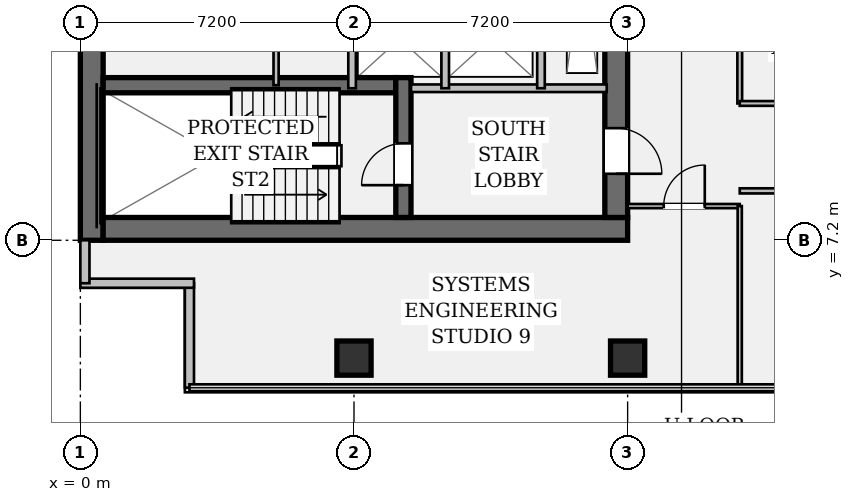
"""IFC4 building model, lengths in metres.
Left out: names, types, materials, properties, quantities, classifications, styles, units other than length and angle.
Written with IfcOpenShell. Run it as: python <this file> out.ifc"""

import sys

from ifc_helpers import new_model, si_unit, direction, frame, frame_2d, origin, origin_2d, place, context, subcontext, project, spatial, rectangle, hollow_rectangle, extrude, element, fill, save


model = new_model("IFC4")
c1 = context("Model", 3, precision=1e-05, world=origin(), true_north=direction((0.0, 1.0)))
c2 = subcontext(c1, "Body", "Model", "MODEL_VIEW")
j1 = project(units=[si_unit("LENGTHUNIT", "METRE"), si_unit("PLANEANGLEUNIT", "RADIAN")], contexts=[c1])
p1 = place(None, origin())
s1 = spatial("IfcSite", under=j1, at=p1, CompositionType="ELEMENT")
p2 = place(p1, origin())
s2 = spatial("IfcBuilding", under=s1, at=p2, CompositionType="ELEMENT")
p3 = place(p2, frame((0.0, 0.0, 117.6)))
s3 = spatial("IfcBuildingStorey", under=s2, at=p3, CompositionType="ELEMENT", Elevation=117.6)
p4 = place(p3, frame((0.3, 7.2, 0.0), z_axis=(0.0, 0.0, 1.0), x_axis=(0.0, 1.0, 0.0)))
e1 = element("IfcWall", 1, at=p4, inside=s3, PredefinedType="SHEAR", context=c2, shape_type="SweptSolid", body=[
    extrude(rectangle(XDim=28.8, YDim=0.6, at=frame_2d((14.4, 0.0))), origin(), (0.0, 0.0, 1.0), 3.58),
])
p5 = place(p3, frame((0.6, 7.5, 0.0), z_axis=(0.0, 0.0, 1.0), x_axis=(1.0, 0.0, 0.0)))
e2 = element("IfcWall", 2, at=p5, inside=s3, PredefinedType="SHEAR", context=c2, shape_type="SweptSolid", body=[
    extrude(rectangle(XDim=13.8, YDim=0.6, at=frame_2d((6.9, 0.0))), origin(), (0.0, 0.0, 1.0), 3.58),
])
p6 = place(p3, frame((14.1, 35.4, 0.0), z_axis=(0.0, 0.0, 1.0), x_axis=(0.0, -1.0, 0.0)))
e3 = element("IfcWall", 3, at=p6, inside=s3, PredefinedType="SHEAR", context=c2, shape_type="SweptSolid", body=[
    extrude(rectangle(XDim=27.6, YDim=0.6, at=frame_2d((13.8, 0.0))), origin(), (0.0, 0.0, 1.0), 3.58),
])
p7 = place(p6, frame((1.3, 0.0, 0.0)))
e4 = element("IfcOpeningElement", 4, at=p7, cuts=e3, PredefinedType="OPENING", context=c2, shape_type="SweptSolid", body=[
    extrude(rectangle(XDim=1.2, YDim=2.15, at=frame_2d((0.6, 1.075))), frame((0.0, 0.312, 0.0), z_axis=(0.0, -1.0, 0.0), x_axis=(1.0, 0.0, 0.0)), (0.0, 0.0, 1.0), 0.624),
])
p8 = place(p6, frame((25.25, 0.0, 0.0)))
e5 = element("IfcOpeningElement", 5, at=p8, cuts=e3, PredefinedType="OPENING", context=c2, shape_type="SweptSolid", body=[
    extrude(rectangle(XDim=1.2, YDim=2.15, at=frame_2d((0.6, 1.075))), frame((0.0, 0.312, 0.0), z_axis=(0.0, -1.0, 0.0), x_axis=(1.0, 0.0, 0.0)), (0.0, 0.0, 1.0), 0.624),
])
p9 = place(p6, frame((14.6, 0.0, 0.0)))
e6 = element("IfcOpeningElement", 6, at=p9, cuts=e3, PredefinedType="OPENING", context=c2, shape_type="SweptSolid", body=[
    extrude(rectangle(XDim=1.6, YDim=2.2, at=frame_2d((0.8, 1.1))), frame((0.0, 0.312, 0.0), z_axis=(0.0, -1.0, 0.0), x_axis=(1.0, 0.0, 0.0)), (0.0, 0.0, 1.0), 0.624),
])
p10 = place(p3, frame((0.6, 11.28, 0.0), z_axis=(0.0, 0.0, 1.0), x_axis=(1.0, 0.0, 0.0)))
e7 = element("IfcWall", 7, at=p10, inside=s3, PredefinedType="SHEAR", context=c2, shape_type="SweptSolid", body=[
    extrude(rectangle(XDim=7.7, YDim=0.4, at=frame_2d((3.85, 0.0))), origin(), (0.0, 0.0, 1.0), 3.58),
])
p11 = place(p3, frame((8.5, 7.8, 0.0), z_axis=(0.0, 0.0, 1.0), x_axis=(0.0, 1.0, 0.0)))
e8 = element("IfcWall", 8, at=p11, inside=s3, PredefinedType="SHEAR", context=c2, shape_type="SweptSolid", body=[
    extrude(rectangle(XDim=3.68, YDim=0.4, at=frame_2d((1.84, 0.0))), origin(), (0.0, 0.0, 1.0), 3.58),
])
p12 = place(p11, frame((0.85, 0.0, 0.0)))
e9 = element("IfcOpeningElement", 9, at=p12, cuts=e8, PredefinedType="OPENING", context=c2, shape_type="SweptSolid", body=[
    extrude(rectangle(XDim=1.1, YDim=2.15, at=frame_2d((0.55, 1.075))), frame((0.0, 0.212, 0.0), z_axis=(0.0, -1.0, 0.0), x_axis=(1.0, 0.0, 0.0)), (0.0, 0.0, 1.0), 0.424),
])
for number, where, z_axis, x_axis in (
    (10, (7.2, 4.1, 0.0), (0.0, 0.0, 1.0), (1.0, 0.0, 0.0)),
    (11, (14.4, 4.1, 0.0), (0.0, 0.0, 1.0), (1.0, 0.0, 0.0)),
):
    element("IfcColumn", number, at=place(p3, frame(where, z_axis=z_axis, x_axis=x_axis)), inside=s3, PredefinedType="COLUMN", context=c2, shape_type="SweptSolid", body=[
        extrude(hollow_rectangle(XDim=0.9, YDim=0.9, WallThickness=0.055, at=origin_2d()), origin(), (0.0, 0.0, 1.0), 3.58),
    ])
p13 = place(p3, frame((2.87, 3.32, 0.0), z_axis=(0.0, 0.0, 1.0), x_axis=(0.0, 1.0, 0.0)))
e12 = element("IfcWall", 12, at=p13, inside=s3, PredefinedType="STANDARD", context=c2, shape_type="SweptSolid", body=[
    extrude(rectangle(XDim=2.75, YDim=0.24, at=frame_2d((1.375, 0.0))), origin(), (0.0, 0.0, 1.0), 3.58),
])
p14 = place(p3, frame((2.99, 6.07, 0.0), z_axis=(0.0, 0.0, 1.0), x_axis=(-1.0, 0.0, 0.0)))
e13 = element("IfcWall", 13, at=p14, inside=s3, PredefinedType="STANDARD", context=c2, shape_type="SweptSolid", body=[
    extrude(rectangle(XDim=2.99, YDim=0.24, at=frame_2d((1.495, 0.0))), origin(), (0.0, 0.0, 1.0), 3.58),
])
p15 = place(p3, frame((0.12, 6.07, 0.0), z_axis=(0.0, 0.0, 1.0), x_axis=(0.0, 1.0, 0.0)))
e14 = element("IfcWall", 14, at=p15, inside=s3, PredefinedType="STANDARD", context=c2, shape_type="SweptSolid", body=[
    extrude(rectangle(XDim=1.13, YDim=0.24, at=frame_2d((0.565, 0.0))), origin(), (0.0, 0.0, 1.0), 3.58),
])
p16 = place(p3, frame((8.7, 11.2, 0.0), z_axis=(0.0, 0.0, 1.0), x_axis=(1.0, 0.0, 0.0)))
e15 = element("IfcWall", 15, at=p16, inside=s3, PredefinedType="PARTITIONING", context=c2, shape_type="SweptSolid", body=[
    extrude(rectangle(XDim=5.15, YDim=0.2, at=frame_2d((2.575, 0.0))), origin(), (0.0, 0.0, 1.0), 3.58),
])
for number, where, z_axis, x_axis in (
    (16, (7.15, 11.2, 0.0), (0.0, 0.0, 1.0), (0.0, 1.0, 0.0)),
    (17, (9.6, 11.2, 0.0), (0.0, 0.0, 1.0), (0.0, 1.0, 0.0)),
):
    element("IfcWall", number, at=place(p3, frame(where, z_axis=z_axis, x_axis=x_axis)), inside=s3, PredefinedType="PARTITIONING", context=c2, shape_type="SweptSolid", body=[
        extrude(rectangle(XDim=2.4, YDim=0.2, at=frame_2d((1.2, 0.0))), origin(), (0.0, 0.0, 1.0), 3.58),
    ])
p17 = place(p3, frame((12.12, 11.2, 0.0), z_axis=(0.0, 0.0, 1.0), x_axis=(0.0, 1.0, 0.0)))
e18 = element("IfcWall", 18, at=p17, inside=s3, PredefinedType="PARTITIONING", context=c2, shape_type="SweptSolid", body=[
    extrude(rectangle(XDim=6.6, YDim=0.2, at=frame_2d((3.3, 0.0))), origin(), (0.0, 0.0, 1.0), 3.58),
])
p18 = place(p17, frame((2.95, 0.0, 0.0)))
e19 = element("IfcOpeningElement", 19, at=p18, cuts=e18, PredefinedType="OPENING", context=c2, shape_type="SweptSolid", body=[
    extrude(rectangle(XDim=0.85, YDim=2.15, at=frame_2d((0.425, 1.075))), frame((0.0, 0.112, 0.0), z_axis=(0.0, -1.0, 0.0), x_axis=(1.0, 0.0, 0.0)), (0.0, 0.0, 1.0), 0.224),
])
p19 = place(p3, frame((5.15, 11.28, 0.0), z_axis=(0.0, 0.0, 1.0), x_axis=(0.0, 1.0, 0.0)))
e20 = element("IfcWall", 20, at=p19, inside=s3, PredefinedType="PARTITIONING", context=c2, shape_type="SweptSolid", body=[
    extrude(rectangle(XDim=4.42, YDim=0.135, at=frame_2d((2.21, 0.0))), origin(), (0.0, 0.0, 1.0), 3.58),
])
p20 = place(p3, frame((14.4, 8.1, 0.0), z_axis=(0.0, 0.0, 1.0), x_axis=(1.0, 0.0, 0.0)))
e21 = element("IfcWall", 21, at=p20, inside=s3, PredefinedType="PARTITIONING", context=c2, shape_type="SweptSolid", body=[
    extrude(rectangle(XDim=2.95, YDim=0.11, at=frame_2d((1.475, 0.0))), origin(), (0.0, 0.0, 1.0), 3.098),
])
p21 = place(p20, frame((0.95, 0.0, 0.0)))
e22 = element("IfcOpeningElement", 22, at=p21, cuts=e21, PredefinedType="OPENING", context=c2, shape_type="SweptSolid", body=[
    extrude(rectangle(XDim=1.08, YDim=2.15, at=frame_2d((0.54, 1.075))), frame((0.0, 0.067, 0.0), z_axis=(0.0, -1.0, 0.0), x_axis=(1.0, 0.0, 0.0)), (0.0, 0.0, 1.0), 0.134),
])
p22 = place(p3, frame((17.35, 8.5, 0.0), z_axis=(0.0, 0.0, 1.0), x_axis=(1.0, 0.0, 0.0)))
e23 = element("IfcWall", 23, at=p22, inside=s3, PredefinedType="PARTITIONING", context=c2, shape_type="SweptSolid", body=[
    extrude(rectangle(XDim=24.15, YDim=0.135, at=frame_2d((12.075, 0.0))), origin(), (0.0, 0.0, 1.0), 2.869),
])
p23 = place(p22, frame((5.23, 0.0, 0.0)))
e24 = element("IfcOpeningElement", 24, at=p23, cuts=e23, PredefinedType="OPENING", context=c2, shape_type="SweptSolid", body=[
    extrude(rectangle(XDim=1.08, YDim=2.15, at=frame_2d((0.54, 1.075))), frame((0.0, 0.08, 0.0), z_axis=(0.0, -1.0, 0.0), x_axis=(1.0, 0.0, 0.0)), (0.0, 0.0, 1.0), 0.159),
])
p24 = place(p22, frame((16.66, 0.0, 0.0)))
e25 = element("IfcOpeningElement", 25, at=p24, cuts=e23, PredefinedType="OPENING", context=c2, shape_type="SweptSolid", body=[
    extrude(rectangle(XDim=1.08, YDim=2.15, at=frame_2d((0.54, 1.075))), frame((0.0, 0.08, 0.0), z_axis=(0.0, -1.0, 0.0), x_axis=(1.0, 0.0, 0.0)), (0.0, 0.0, 1.0), 0.159),
])
p25 = place(p3, frame((17.35, 10.8, 0.0), z_axis=(0.0, 0.0, 1.0), x_axis=(0.0, 1.0, 0.0)))
e26 = element("IfcWall", 26, at=p25, inside=s3, PredefinedType="PARTITIONING", context=c2, shape_type="SweptSolid", body=[
    extrude(rectangle(XDim=7.55, YDim=0.125, at=frame_2d((3.775, 0.0))), origin(), (0.0, 0.0, 1.0), 2.869),
])
p26 = place(p3, frame((17.35, 10.8, 0.0), z_axis=(0.0, 0.0, 1.0), x_axis=(1.0, 0.0, 0.0)))
e27 = element("IfcWall", 27, at=p26, inside=s3, PredefinedType="PARTITIONING", context=c2, shape_type="SweptSolid", body=[
    extrude(rectangle(XDim=21.8, YDim=0.125, at=frame_2d((10.9, 0.0))), origin(), (0.0, 0.0, 1.0), 2.869),
])
p27 = place(p3, frame((17.35, 3.32, 0.0), z_axis=(0.0, 0.0, 1.0), x_axis=(0.0, 1.0, 0.0)))
e28 = element("IfcWall", 28, at=p27, inside=s3, PredefinedType="PARTITIONING", context=c2, shape_type="SweptSolid", body=[
    extrude(rectangle(XDim=4.78, YDim=0.11, at=frame_2d((2.39, 0.0))), origin(), (0.0, 0.0, 1.0), 2.869),
])
p28 = place(p12, origin())
e29 = element("IfcDoor", 29, at=p28, inside=s3, OperationType="SINGLE_SWING_LEFT", PredefinedType="DOOR", context=c2, shape_type="SweptSolid", body=[
    extrude(rectangle(XDim=1.1, YDim=2.15, at=frame_2d((0.55, 1.075))), frame((0.0, 0.025, 0.0), z_axis=(0.0, -1.0, 0.0), x_axis=(1.0, 0.0, 0.0)), (0.0, 0.0, 1.0), 0.05),
])
fill(e9, e29)
p29 = place(p8, origin())
e30 = element("IfcDoor", 30, at=p29, inside=s3, OperationType="SINGLE_SWING_RIGHT", PredefinedType="DOOR", context=c2, shape_type="SweptSolid", body=[
    extrude(rectangle(XDim=1.2, YDim=2.15, at=frame_2d((0.6, 1.075))), frame((0.0, 0.025, 0.0), z_axis=(0.0, -1.0, 0.0), x_axis=(1.0, 0.0, 0.0)), (0.0, 0.0, 1.0), 0.05),
])
fill(e5, e30)
p30 = place(p21, origin())
e31 = element("IfcDoor", 31, at=p30, inside=s3, OperationType="SINGLE_SWING_RIGHT", PredefinedType="DOOR", context=c2, shape_type="SweptSolid", body=[
    extrude(rectangle(XDim=1.08, YDim=2.15, at=frame_2d((0.54, 1.075))), frame((0.0, 0.025, 0.0), z_axis=(0.0, -1.0, 0.0), x_axis=(1.0, 0.0, 0.0)), (0.0, 0.0, 1.0), 0.05),
])
fill(e22, e31)
save(model, sys.argv[1])
